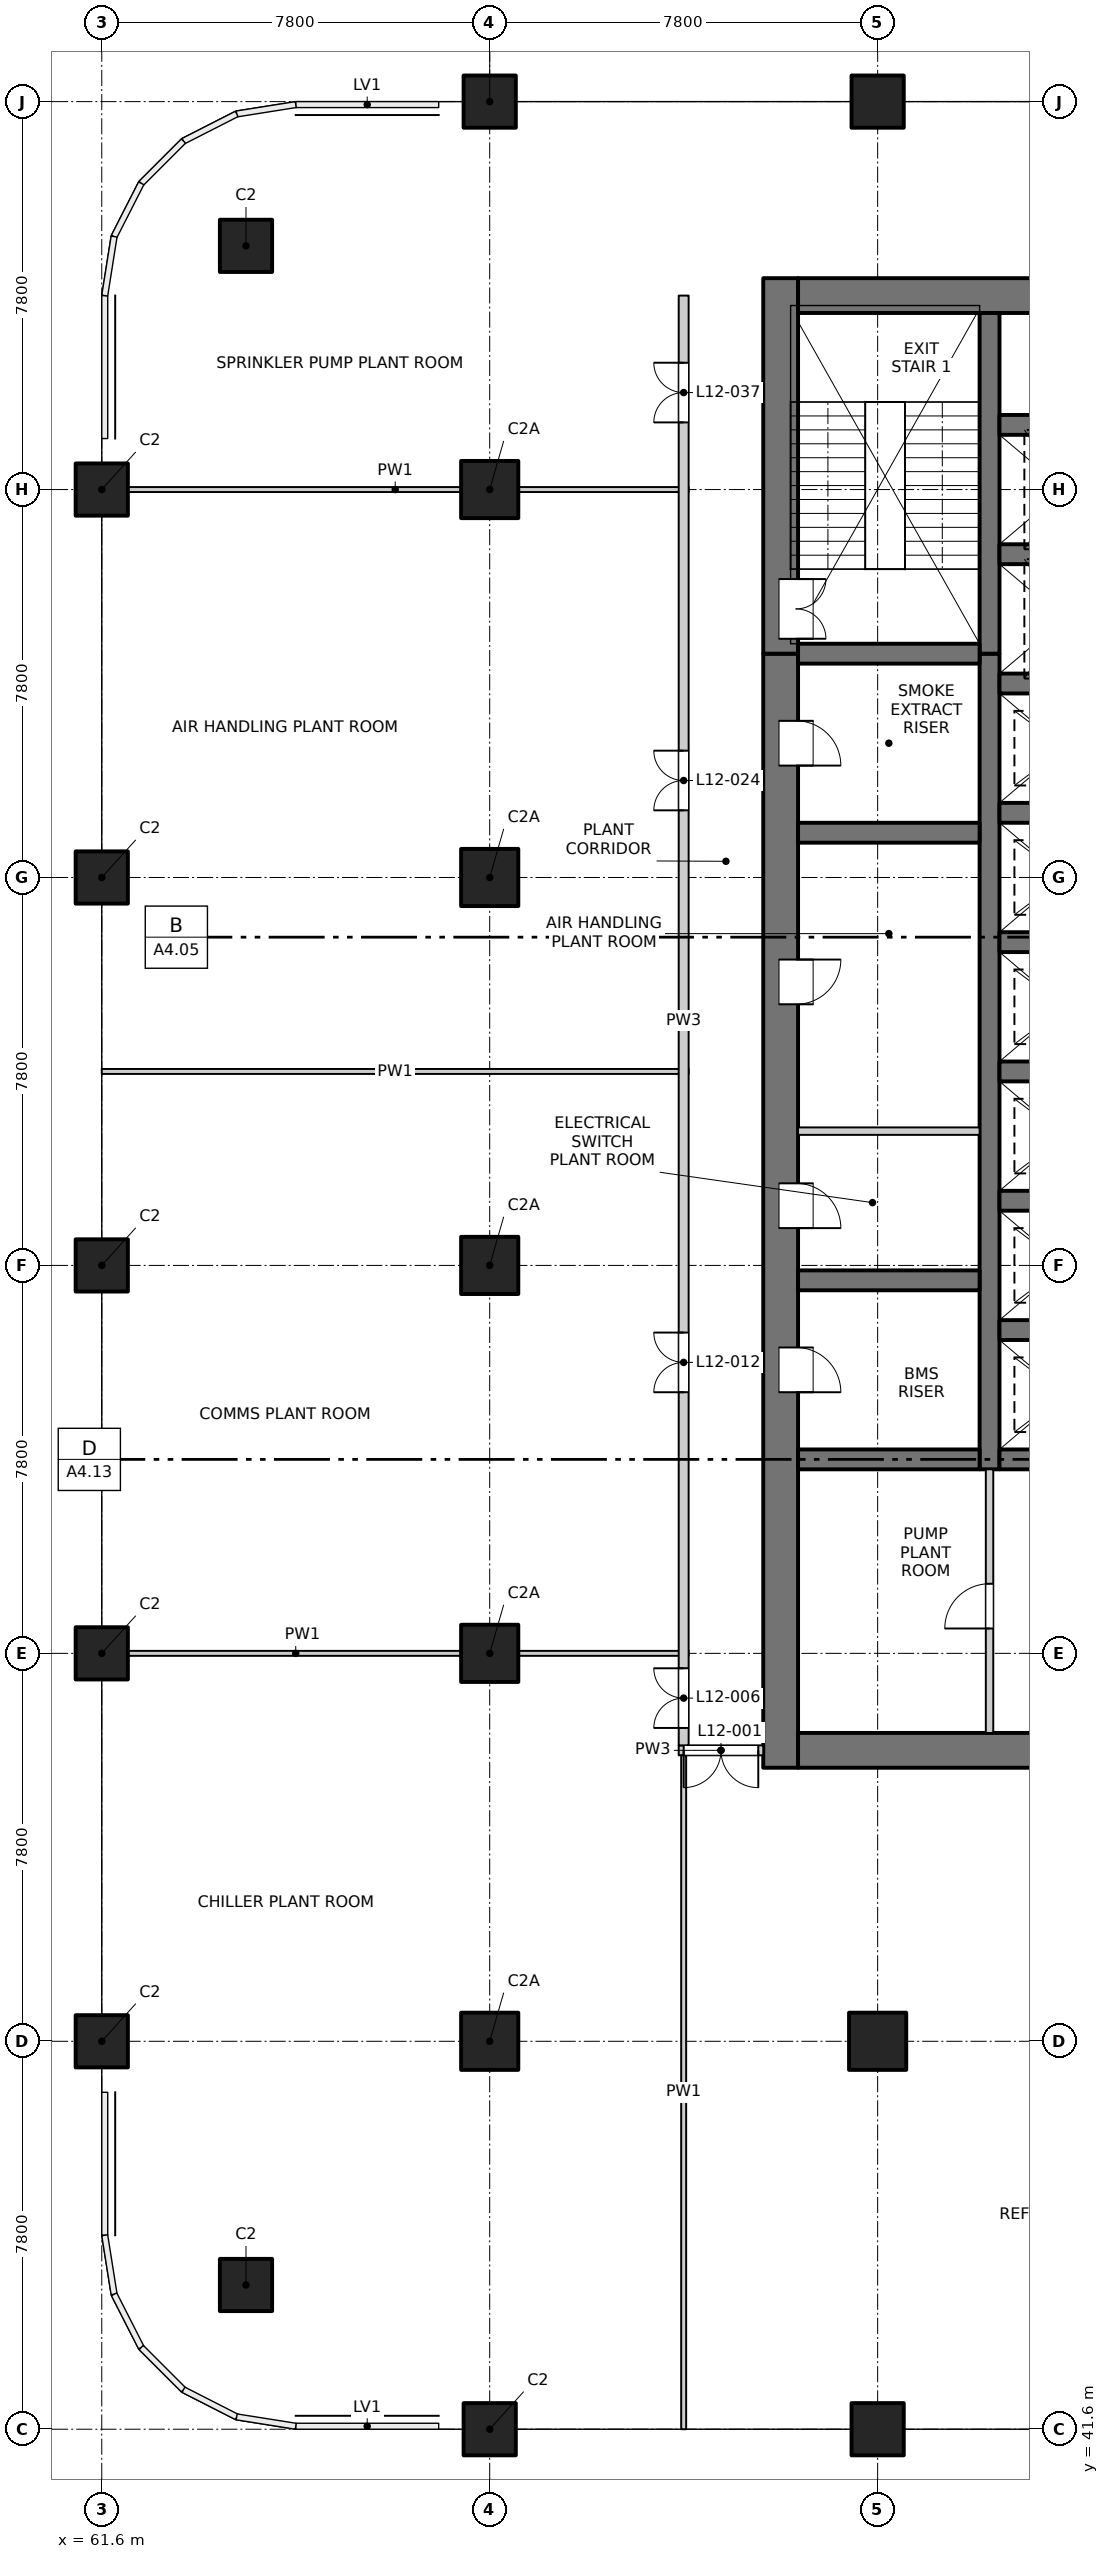
"""IFC4 building model, lengths in metres.
Left out: names, types, materials, properties, quantities, classifications, styles, units other than length and angle.
Written with IfcOpenShell. Run it as: python <this file> out.ifc"""

import sys

from ifc_helpers import new_model, si_unit, direction, frame, frame_2d, origin, origin_2d, place, context, subcontext, project, spatial, rectangle, extrude, element, fill, save


model = new_model("IFC4")
c1 = context("Model", 3, precision=1e-05, world=origin(), true_north=direction((0.0, 1.0)))
c2 = subcontext(c1, "Body", "Model", "MODEL_VIEW")
j1 = project(units=[si_unit("LENGTHUNIT", "METRE"), si_unit("PLANEANGLEUNIT", "RADIAN")], contexts=[c1])
p1 = place(None, origin())
s1 = spatial("IfcSite", under=j1, at=p1, CompositionType="ELEMENT")
p2 = place(p1, origin())
s2 = spatial("IfcBuilding", under=s1, at=p2, CompositionType="ELEMENT")
p3 = place(p2, frame((0.0, 0.0, 46.7)))
s3 = spatial("IfcBuildingStorey", under=s2, at=p3, CompositionType="ELEMENT", Elevation=46.7)
for number, where, z_axis, x_axis in (
    (1, (64.5, 44.5, -0.3), (0.0, 0.0, 1.0), (1.0, 0.0, 0.0)),
    (2, (64.5, 85.5, -0.3), (0.0, 0.0, 1.0), (1.0, 0.0, 0.0)),
    (3, (61.6, 49.4, -0.3), (0.0, 0.0, 1.0), (1.0, 0.0, 0.0)),
    (4, (69.4, 41.6, -0.3), (0.0, 0.0, 1.0), (1.0, 0.0, 0.0)),
    (5, (69.4, 88.4, -0.3), (0.0, 0.0, 1.0), (1.0, 0.0, 0.0)),
    (6, (61.6, 57.2, -0.3), (0.0, 0.0, 1.0), (1.0, 0.0, 0.0)),
    (7, (77.2, 41.6, -0.3), (0.0, 0.0, 1.0), (1.0, 0.0, 0.0)),
    (8, (77.2, 88.4, -0.3), (0.0, 0.0, 1.0), (1.0, 0.0, 0.0)),
    (9, (61.6, 65.0, -0.3), (0.0, 0.0, 1.0), (1.0, 0.0, 0.0)),
    (10, (61.6, 72.8, -0.3), (0.0, 0.0, 1.0), (1.0, 0.0, 0.0)),
    (11, (61.6, 80.6, -0.3), (0.0, 0.0, 1.0), (1.0, 0.0, 0.0)),
):
    element("IfcColumn", number, at=place(p3, frame(where, z_axis=z_axis, x_axis=x_axis)), inside=s3, PredefinedType="COLUMN", context=c2, shape_type="SweptSolid", body=[
        extrude(rectangle(XDim=1.05, YDim=1.05, at=origin_2d()), origin(), (0.0, 0.0, 1.0), 4.5),
    ])
for number, where, z_axis, x_axis in (
    (12, (69.4, 49.4, -0.3), (0.0, 0.0, 1.0), (1.0, 0.0, 0.0)),
    (13, (69.4, 57.2, -0.3), (0.0, 0.0, 1.0), (1.0, 0.0, 0.0)),
    (14, (69.4, 65.0, -0.3), (0.0, 0.0, 1.0), (1.0, 0.0, 0.0)),
    (15, (69.4, 72.8, -0.3), (0.0, 0.0, 1.0), (1.0, 0.0, 0.0)),
    (16, (69.4, 80.6, -0.3), (0.0, 0.0, 1.0), (1.0, 0.0, 0.0)),
    (17, (77.2, 49.4, -0.3), (0.0, 0.0, 1.0), (1.0, 0.0, 0.0)),
):
    element("IfcColumn", number, at=place(p3, frame(where, z_axis=z_axis, x_axis=x_axis)), inside=s3, PredefinedType="COLUMN", context=c2, shape_type="SweptSolid", body=[
        extrude(rectangle(XDim=1.15, YDim=1.15, at=origin_2d()), origin(), (0.0, 0.0, 1.0), 4.5),
    ])
p4 = place(p3, frame((75.25, 54.9, -0.3), z_axis=(0.0, 0.0, 1.0), x_axis=(0.0, 1.0, 0.0)))
e18 = element("IfcWall", 18, at=p4, inside=s3, PredefinedType="SOLIDWALL", context=c2, shape_type="SweptSolid", body=[
    extrude(rectangle(XDim=22.4, YDim=0.7, at=frame_2d((11.2, 0.0))), origin(), (0.0, 0.0, 1.0), 4.5),
])
p5 = place(p4, frame((7.55, 0.0, 0.3)))
e19 = element("IfcOpeningElement", 19, at=p5, cuts=e18, PredefinedType="OPENING", context=c2, shape_type="SweptSolid", body=[
    extrude(rectangle(XDim=0.9, YDim=2.1, at=frame_2d((0.45, 1.05))), frame((0.0, 0.36, 0.0), z_axis=(0.0, -1.0, 0.0), x_axis=(1.0, 0.0, 0.0)), (0.0, 0.0, 1.0), 0.72),
])
p6 = place(p4, frame((10.85, 0.0, 0.3)))
e20 = element("IfcOpeningElement", 20, at=p6, cuts=e18, PredefinedType="OPENING", context=c2, shape_type="SweptSolid", body=[
    extrude(rectangle(XDim=0.9, YDim=2.1, at=frame_2d((0.45, 1.05))), frame((0.0, 0.36, 0.0), z_axis=(0.0, -1.0, 0.0), x_axis=(1.0, 0.0, 0.0)), (0.0, 0.0, 1.0), 0.72),
])
p7 = place(p4, frame((15.35, 0.0, 0.3)))
e21 = element("IfcOpeningElement", 21, at=p7, cuts=e18, PredefinedType="OPENING", context=c2, shape_type="SweptSolid", body=[
    extrude(rectangle(XDim=0.9, YDim=2.1, at=frame_2d((0.45, 1.05))), frame((0.0, 0.36, 0.0), z_axis=(0.0, -1.0, 0.0), x_axis=(1.0, 0.0, 0.0)), (0.0, 0.0, 1.0), 0.72),
])
p8 = place(p4, frame((20.15, 0.0, 0.3)))
e22 = element("IfcOpeningElement", 22, at=p8, cuts=e18, PredefinedType="OPENING", context=c2, shape_type="SweptSolid", body=[
    extrude(rectangle(XDim=0.9, YDim=2.1, at=frame_2d((0.45, 1.05))), frame((0.0, 0.36, 0.0), z_axis=(0.0, -1.0, 0.0), x_axis=(1.0, 0.0, 0.0)), (0.0, 0.0, 1.0), 0.72),
])
p9 = place(p3, frame((75.25, 77.3, -0.3), z_axis=(0.0, 0.0, 1.0), x_axis=(0.0, 1.0, 0.0)))
e23 = element("IfcWall", 23, at=p9, inside=s3, PredefinedType="SOLIDWALL", context=c2, shape_type="SweptSolid", body=[
    extrude(rectangle(XDim=7.55, YDim=0.7, at=frame_2d((3.775, 0.0))), origin(), (0.0, 0.0, 1.0), 4.5),
])
p10 = place(p9, frame((0.3, 0.0, 0.3)))
e24 = element("IfcOpeningElement", 24, at=p10, cuts=e23, PredefinedType="OPENING", context=c2, shape_type="SweptSolid", body=[
    extrude(rectangle(XDim=1.2, YDim=2.1, at=frame_2d((0.6, 1.05))), frame((0.0, 0.36, 0.0), z_axis=(0.0, -1.0, 0.0), x_axis=(1.0, 0.0, 0.0)), (0.0, 0.0, 1.0), 0.72),
])
p11 = place(p3, frame((75.6, 55.25, -0.3), z_axis=(0.0, 0.0, 1.0), x_axis=(1.0, 0.0, 0.0)))
e25 = element("IfcWall", 25, at=p11, inside=s3, PredefinedType="SOLIDWALL", context=c2, shape_type="SweptSolid", body=[
    extrude(rectangle(XDim=18.8, YDim=0.7, at=frame_2d((9.4, 0.0))), origin(), (0.0, 0.0, 1.0), 4.5),
])
p12 = place(p11, frame((7.15, 0.0, 0.3)))
e26 = element("IfcOpeningElement", 26, at=p12, cuts=e25, PredefinedType="OPENING", context=c2, shape_type="SweptSolid", body=[
    extrude(rectangle(XDim=1.5, YDim=2.1, at=frame_2d((0.75, 1.05))), frame((0.0, 0.36, 0.0), z_axis=(0.0, -1.0, 0.0), x_axis=(1.0, 0.0, 0.0)), (0.0, 0.0, 1.0), 0.72),
])
p13 = place(p3, frame((75.6, 84.5, -0.3), z_axis=(0.0, 0.0, 1.0), x_axis=(1.0, 0.0, 0.0)))
e27 = element("IfcWall", 27, at=p13, inside=s3, PredefinedType="SOLIDWALL", context=c2, shape_type="SweptSolid", body=[
    extrude(rectangle(XDim=18.8, YDim=0.7, at=frame_2d((9.4, 0.0))), origin(), (0.0, 0.0, 1.0), 4.5),
])
p14 = place(p3, frame((79.45, 60.9, -0.3), z_axis=(0.0, 0.0, 1.0), x_axis=(0.0, 1.0, 0.0)))
e28 = element("IfcWall", 28, at=p14, inside=s3, PredefinedType="SOLIDWALL", context=c2, shape_type="SweptSolid", body=[
    extrude(rectangle(XDim=16.4, YDim=0.4, at=frame_2d((8.2, 0.0))), origin(), (0.0, 0.0, 1.0), 4.5),
])
p15 = place(p3, frame((79.45, 77.3, -0.3), z_axis=(0.0, 0.0, 1.0), x_axis=(0.0, 1.0, 0.0)))
e29 = element("IfcWall", 29, at=p15, inside=s3, PredefinedType="SOLIDWALL", context=c2, shape_type="SweptSolid", body=[
    extrude(rectangle(XDim=6.85, YDim=0.4, at=frame_2d((3.425, 0.0))), origin(), (0.0, 0.0, 1.0), 4.5),
])
for number, where, z_axis, x_axis in (
    (30, (79.65, 61.1, -0.3), (0.0, 0.0, 1.0), (1.0, 0.0, 0.0)),
    (31, (79.65, 63.7, -0.3), (0.0, 0.0, 1.0), (1.0, 0.0, 0.0)),
    (32, (79.65, 66.3, -0.3), (0.0, 0.0, 1.0), (1.0, 0.0, 0.0)),
    (33, (79.65, 68.9, -0.3), (0.0, 0.0, 1.0), (1.0, 0.0, 0.0)),
    (34, (79.65, 71.5, -0.3), (0.0, 0.0, 1.0), (1.0, 0.0, 0.0)),
    (35, (79.65, 74.1, -0.3), (0.0, 0.0, 1.0), (1.0, 0.0, 0.0)),
    (36, (79.65, 76.7, -0.3), (0.0, 0.0, 1.0), (1.0, 0.0, 0.0)),
    (37, (79.65, 79.3, -0.3), (0.0, 0.0, 1.0), (1.0, 0.0, 0.0)),
    (38, (79.65, 81.9, -0.3), (0.0, 0.0, 1.0), (1.0, 0.0, 0.0)),
):
    element("IfcWall", number, at=place(p3, frame(where, z_axis=z_axis, x_axis=x_axis)), inside=s3, PredefinedType="SOLIDWALL", context=c2, shape_type="SweptSolid", body=[
        extrude(rectangle(XDim=3.0, YDim=0.4, at=frame_2d((1.5, 0.0))), origin(), (0.0, 0.0, 1.0), 4.5),
    ])
for number, where, z_axis, x_axis in (
    (39, (75.6, 61.1, -0.3), (0.0, 0.0, 1.0), (1.0, 0.0, 0.0)),
    (40, (75.6, 64.7, -0.3), (0.0, 0.0, 1.0), (1.0, 0.0, 0.0)),
    (41, (75.6, 73.7, -0.3), (0.0, 0.0, 1.0), (1.0, 0.0, 0.0)),
    (42, (75.6, 77.3, -0.3), (0.0, 0.0, 1.0), (1.0, 0.0, 0.0)),
):
    element("IfcWall", number, at=place(p3, frame(where, z_axis=z_axis, x_axis=x_axis)), inside=s3, PredefinedType="SOLIDWALL", context=c2, shape_type="SweptSolid", body=[
        extrude(rectangle(XDim=3.65, YDim=0.4, at=frame_2d((1.825, 0.0))), origin(), (0.0, 0.0, 1.0), 4.5),
    ])
p16 = place(p3, frame((73.2, 55.25, 0.0), z_axis=(0.0, 0.0, 1.0), x_axis=(1.0, 0.0, 0.0)))
e43 = element("IfcWall", 43, at=p16, inside=s3, PredefinedType="PARTITIONING", context=c2, shape_type="SweptSolid", body=[
    extrude(rectangle(XDim=1.7, YDim=0.2, at=frame_2d((0.85, 0.0))), origin(), (0.0, 0.0, 1.0), 4.2),
])
p17 = place(p16, frame((0.1, 0.0, 0.0)))
e44 = element("IfcOpeningElement", 44, at=p17, cuts=e43, PredefinedType="OPENING", context=c2, shape_type="SweptSolid", body=[
    extrude(rectangle(XDim=1.5, YDim=2.1, at=frame_2d((0.75, 1.05))), frame((0.0, 0.11, 0.0), z_axis=(0.0, -1.0, 0.0), x_axis=(1.0, 0.0, 0.0)), (0.0, 0.0, 1.0), 0.22),
])
p18 = place(p3, frame((61.6, 57.2, 0.0), z_axis=(0.0, 0.0, 1.0), x_axis=(1.0, 0.0, 0.0)))
e45 = element("IfcWall", 45, at=p18, inside=s3, PredefinedType="PARTITIONING", context=c2, shape_type="SweptSolid", body=[
    extrude(rectangle(XDim=7.8, YDim=0.1, at=frame_2d((3.9, 0.0))), origin(), (0.0, 0.0, 1.0), 3.6),
])
p19 = place(p3, frame((69.4, 57.2, 0.0), z_axis=(0.0, 0.0, 1.0), x_axis=(1.0, 0.0, 0.0)))
e46 = element("IfcWall", 46, at=p19, inside=s3, PredefinedType="PARTITIONING", context=c2, shape_type="SweptSolid", body=[
    extrude(rectangle(XDim=4.0, YDim=0.1, at=frame_2d((2.0, 0.0))), origin(), (0.0, 0.0, 1.0), 4.2),
])
p20 = place(p3, frame((75.6, 67.7, 0.0), z_axis=(0.0, 0.0, 1.0), x_axis=(1.0, 0.0, 0.0)))
e47 = element("IfcWall", 47, at=p20, inside=s3, PredefinedType="PARTITIONING", context=c2, shape_type="SweptSolid", body=[
    extrude(rectangle(XDim=3.65, YDim=0.15, at=frame_2d((1.825, 0.0))), origin(), (0.0, 0.0, 1.0), 4.2),
])
for number, where, z_axis, x_axis in (
    (48, (61.6, 68.9, 0.0), (0.0, 0.0, 1.0), (1.0, 0.0, 0.0)),
    (49, (61.6, 80.6, 0.0), (0.0, 0.0, 1.0), (1.0, 0.0, 0.0)),
):
    element("IfcWall", number, at=place(p3, frame(where, z_axis=z_axis, x_axis=x_axis)), inside=s3, PredefinedType="PARTITIONING", context=c2, shape_type="SweptSolid", body=[
        extrude(rectangle(XDim=11.8, YDim=0.1, at=frame_2d((5.9, 0.0))), origin(), (0.0, 0.0, 1.0), 4.2),
    ])
p21 = place(p3, frame((73.3, 41.6, 0.0), z_axis=(0.0, 0.0, 1.0), x_axis=(0.0, 1.0, 0.0)))
e50 = element("IfcWall", 50, at=p21, inside=s3, PredefinedType="PARTITIONING", context=c2, shape_type="SweptSolid", body=[
    extrude(rectangle(XDim=13.55, YDim=0.1, at=frame_2d((6.775, 0.0))), origin(), (0.0, 0.0, 1.0), 4.2),
])
p22 = place(p3, frame((73.3, 55.35, 0.0), z_axis=(0.0, 0.0, 1.0), x_axis=(0.0, 1.0, 0.0)))
e51 = element("IfcWall", 51, at=p22, inside=s3, PredefinedType="PARTITIONING", context=c2, shape_type="SweptSolid", body=[
    extrude(rectangle(XDim=29.15, YDim=0.2, at=frame_2d((14.575, 0.0))), origin(), (0.0, 0.0, 1.0), 4.2),
])
p23 = place(p22, frame((0.35, 0.0, 0.0)))
e52 = element("IfcOpeningElement", 52, at=p23, cuts=e51, PredefinedType="OPENING", context=c2, shape_type="SweptSolid", body=[
    extrude(rectangle(XDim=1.2, YDim=2.1, at=frame_2d((0.6, 1.05))), frame((0.0, 0.11, 0.0), z_axis=(0.0, -1.0, 0.0), x_axis=(1.0, 0.0, 0.0)), (0.0, 0.0, 1.0), 0.22),
])
p24 = place(p22, frame((7.1, 0.0, 0.0)))
e53 = element("IfcOpeningElement", 53, at=p24, cuts=e51, PredefinedType="OPENING", context=c2, shape_type="SweptSolid", body=[
    extrude(rectangle(XDim=1.2, YDim=2.1, at=frame_2d((0.6, 1.05))), frame((0.0, 0.11, 0.0), z_axis=(0.0, -1.0, 0.0), x_axis=(1.0, 0.0, 0.0)), (0.0, 0.0, 1.0), 0.22),
])
p25 = place(p22, frame((18.8, 0.0, 0.0)))
e54 = element("IfcOpeningElement", 54, at=p25, cuts=e51, PredefinedType="OPENING", context=c2, shape_type="SweptSolid", body=[
    extrude(rectangle(XDim=1.2, YDim=2.1, at=frame_2d((0.6, 1.05))), frame((0.0, 0.11, 0.0), z_axis=(0.0, -1.0, 0.0), x_axis=(1.0, 0.0, 0.0)), (0.0, 0.0, 1.0), 0.22),
])
p26 = place(p22, frame((26.6, 0.0, 0.0)))
e55 = element("IfcOpeningElement", 55, at=p26, cuts=e51, PredefinedType="OPENING", context=c2, shape_type="SweptSolid", body=[
    extrude(rectangle(XDim=1.2, YDim=2.1, at=frame_2d((0.6, 1.05))), frame((0.0, 0.11, 0.0), z_axis=(0.0, -1.0, 0.0), x_axis=(1.0, 0.0, 0.0)), (0.0, 0.0, 1.0), 0.22),
])
p27 = place(p3, frame((79.45, 55.6, 0.0), z_axis=(0.0, 0.0, 1.0), x_axis=(0.0, 1.0, 0.0)))
e56 = element("IfcWall", 56, at=p27, inside=s3, PredefinedType="PARTITIONING", context=c2, shape_type="SweptSolid", body=[
    extrude(rectangle(XDim=5.3, YDim=0.15, at=frame_2d((2.65, 0.0))), origin(), (0.0, 0.0, 1.0), 4.2),
])
p28 = place(p27, frame((2.1, 0.0, 0.0)))
e57 = element("IfcOpeningElement", 57, at=p28, cuts=e56, PredefinedType="OPENING", context=c2, shape_type="SweptSolid", body=[
    extrude(rectangle(XDim=0.9, YDim=2.1, at=frame_2d((0.45, 1.05))), frame((0.0, 0.085, 0.0), z_axis=(0.0, -1.0, 0.0), x_axis=(1.0, 0.0, 0.0)), (0.0, 0.0, 1.0), 0.17),
])
p29 = place(p17, origin())
e58 = element("IfcDoor", 58, at=p29, inside=s3, OperationType="DOUBLE_DOOR_SINGLE_SWING", PredefinedType="DOOR", context=c2, shape_type="SweptSolid", body=[
    extrude(rectangle(XDim=1.5, YDim=2.1, at=frame_2d((0.75, 1.05))), frame((0.0, 0.025, 0.0), z_axis=(0.0, -1.0, 0.0), x_axis=(1.0, 0.0, 0.0)), (0.0, 0.0, 1.0), 0.05),
])
fill(e44, e58)
p30 = place(p23, origin())
e59 = element("IfcDoor", 59, at=p30, inside=s3, OperationType="DOUBLE_DOOR_SINGLE_SWING", PredefinedType="DOOR", context=c2, shape_type="SweptSolid", body=[
    extrude(rectangle(XDim=1.2, YDim=2.1, at=frame_2d((0.6, 1.05))), frame((0.0, 0.025, 0.0), z_axis=(0.0, -1.0, 0.0), x_axis=(1.0, 0.0, 0.0)), (0.0, 0.0, 1.0), 0.05),
])
fill(e52, e59)
p31 = place(p28, origin())
e60 = element("IfcDoor", 60, at=p31, inside=s3, OperationType="SINGLE_SWING_LEFT", PredefinedType="DOOR", context=c2, shape_type="SweptSolid", body=[
    extrude(rectangle(XDim=0.9, YDim=2.1, at=frame_2d((0.45, 1.05))), frame((0.0, 0.025, 0.0), z_axis=(0.0, -1.0, 0.0), x_axis=(1.0, 0.0, 0.0)), (0.0, 0.0, 1.0), 0.05),
])
fill(e57, e60)
p32 = place(p5, origin())
e61 = element("IfcDoor", 61, at=p32, inside=s3, OperationType="SINGLE_SWING_RIGHT", PredefinedType="DOOR", context=c2, shape_type="SweptSolid", body=[
    extrude(rectangle(XDim=0.9, YDim=2.1, at=frame_2d((0.45, 1.05))), frame((0.0, -0.285, 0.0), z_axis=(0.0, -1.0, 0.0), x_axis=(1.0, 0.0, 0.0)), (0.0, 0.0, 1.0), 0.05),
])
fill(e19, e61)
p33 = place(p24, origin())
e62 = element("IfcDoor", 62, at=p33, inside=s3, OperationType="DOUBLE_DOOR_SINGLE_SWING", PredefinedType="DOOR", context=c2, shape_type="SweptSolid", body=[
    extrude(rectangle(XDim=1.2, YDim=2.1, at=frame_2d((0.6, 1.05))), frame((0.0, 0.025, 0.0), z_axis=(0.0, -1.0, 0.0), x_axis=(1.0, 0.0, 0.0)), (0.0, 0.0, 1.0), 0.05),
])
fill(e53, e62)
p34 = place(p6, origin())
e63 = element("IfcDoor", 63, at=p34, inside=s3, OperationType="SINGLE_SWING_RIGHT", PredefinedType="DOOR", context=c2, shape_type="SweptSolid", body=[
    extrude(rectangle(XDim=0.9, YDim=2.1, at=frame_2d((0.45, 1.05))), frame((0.0, -0.285, 0.0), z_axis=(0.0, -1.0, 0.0), x_axis=(1.0, 0.0, 0.0)), (0.0, 0.0, 1.0), 0.05),
])
fill(e20, e63)
p35 = place(p7, origin())
e64 = element("IfcDoor", 64, at=p35, inside=s3, OperationType="SINGLE_SWING_LEFT", PredefinedType="DOOR", context=c2, shape_type="SweptSolid", body=[
    extrude(rectangle(XDim=0.9, YDim=2.1, at=frame_2d((0.45, 1.05))), frame((0.0, -0.285, 0.0), z_axis=(0.0, -1.0, 0.0), x_axis=(1.0, 0.0, 0.0)), (0.0, 0.0, 1.0), 0.05),
])
fill(e21, e64)
p36 = place(p25, origin())
e65 = element("IfcDoor", 65, at=p36, inside=s3, OperationType="DOUBLE_DOOR_SINGLE_SWING", PredefinedType="DOOR", context=c2, shape_type="SweptSolid", body=[
    extrude(rectangle(XDim=1.2, YDim=2.1, at=frame_2d((0.6, 1.05))), frame((0.0, 0.025, 0.0), z_axis=(0.0, -1.0, 0.0), x_axis=(1.0, 0.0, 0.0)), (0.0, 0.0, 1.0), 0.05),
])
fill(e54, e65)
p37 = place(p8, origin())
e66 = element("IfcDoor", 66, at=p37, inside=s3, OperationType="SINGLE_SWING_RIGHT", PredefinedType="DOOR", context=c2, shape_type="SweptSolid", body=[
    extrude(rectangle(XDim=0.9, YDim=2.1, at=frame_2d((0.45, 1.05))), frame((0.0, -0.285, 0.0), z_axis=(0.0, -1.0, 0.0), x_axis=(1.0, 0.0, 0.0)), (0.0, 0.0, 1.0), 0.05),
])
fill(e22, e66)
p38 = place(p10, origin())
e67 = element("IfcDoor", 67, at=p38, inside=s3, OperationType="DOUBLE_DOOR_SINGLE_SWING", PredefinedType="DOOR", context=c2, shape_type="SweptSolid", body=[
    extrude(rectangle(XDim=1.2, YDim=2.1, at=frame_2d((0.6, 1.05))), frame((0.0, -0.285, 0.0), z_axis=(0.0, -1.0, 0.0), x_axis=(1.0, 0.0, 0.0)), (0.0, 0.0, 1.0), 0.05),
])
fill(e24, e67)
p39 = place(p26, origin())
e68 = element("IfcDoor", 68, at=p39, inside=s3, OperationType="DOUBLE_DOOR_SINGLE_SWING", PredefinedType="DOOR", context=c2, shape_type="SweptSolid", body=[
    extrude(rectangle(XDim=1.2, YDim=2.1, at=frame_2d((0.6, 1.05))), frame((0.0, 0.025, 0.0), z_axis=(0.0, -1.0, 0.0), x_axis=(1.0, 0.0, 0.0)), (0.0, 0.0, 1.0), 0.05),
])
fill(e55, e68)
save(model, sys.argv[1])
